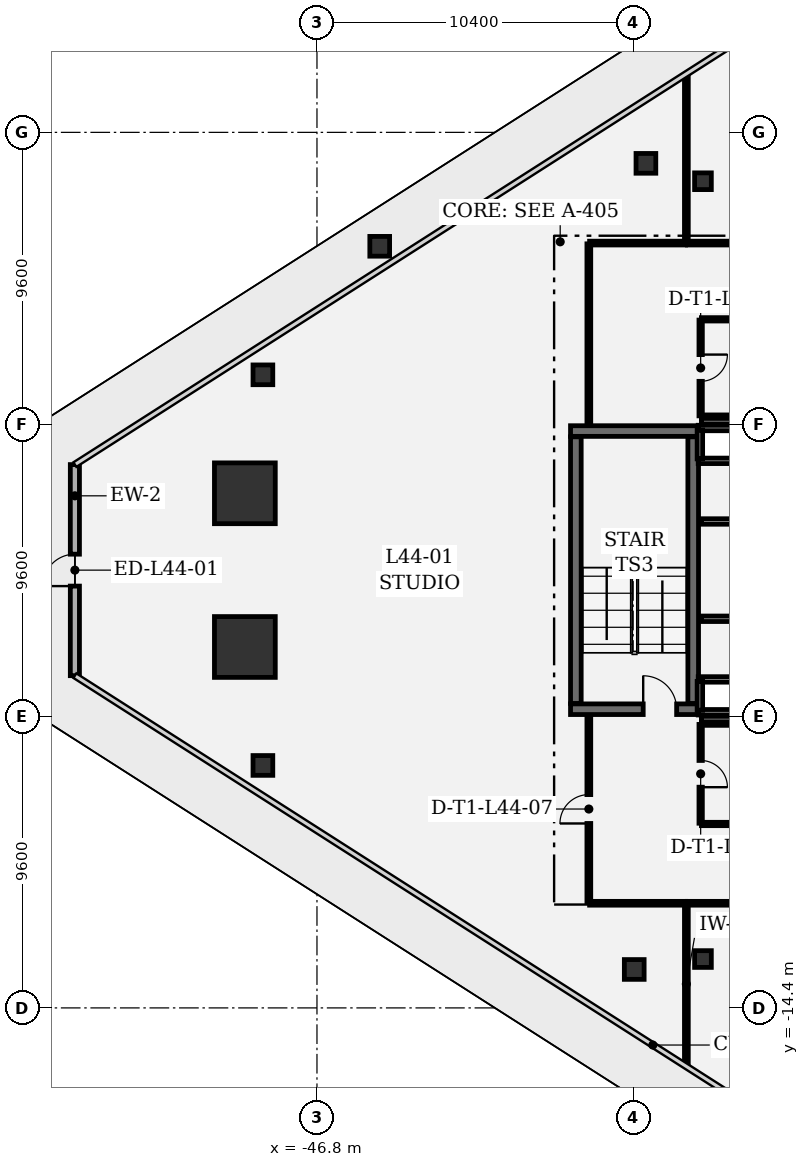
"""IFC4 building model, lengths in metres.
Left out: names, types, materials, properties, quantities, classifications, styles, units other than length and angle.
Written with IfcOpenShell. Run it as: python <this file> out.ifc"""

import sys

from ifc_helpers import new_model, si_unit, direction, frame, frame_2d, origin, origin_2d, place, context, subcontext, project, spatial, rectangle, extrude, element, fill, save


model = new_model("IFC4")
c1 = context("Model", 3, precision=1e-05, world=origin(), true_north=direction((0.0, 1.0)))
c2 = subcontext(c1, "Body", "Model", "MODEL_VIEW")
j1 = project(units=[si_unit("LENGTHUNIT", "METRE"), si_unit("PLANEANGLEUNIT", "RADIAN")], contexts=[c1])
p1 = place(None, origin())
s1 = spatial("IfcSite", under=j1, at=p1, CompositionType="ELEMENT")
p2 = place(p1, origin())
s2 = spatial("IfcBuilding", under=s1, at=p2, CompositionType="ELEMENT")
p3 = place(p2, frame((0.0, 0.0, 192.9)))
s3 = spatial("IfcBuildingStorey", under=s2, at=p3, CompositionType="ELEMENT", Elevation=192.9)
for number, where, z_axis, x_axis in (
    (1, (-49.172, 2.528, 0.0), (0.0, 0.0, 1.0), (1.0, 0.0, 0.0)),
    (2, (-49.172, -2.528, 0.0), (0.0, 0.0, 1.0), (1.0, 0.0, 0.0)),
):
    element("IfcColumn", number, at=place(p3, frame(where, z_axis=z_axis, x_axis=x_axis)), inside=s3, PredefinedType="COLUMN", context=c2, shape_type="SweptSolid", body=[
        extrude(rectangle(XDim=2.0, YDim=2.0, at=origin_2d()), origin(), (0.0, 0.0, 1.0), 4.05),
    ])
for number, where, z_axis, x_axis in (
    (3, (-44.736, 10.652, 0.0), (0.0, 0.0, 1.0), (1.0, 0.0, 0.0)),
    (4, (-48.578, 6.425, 0.0), (0.0, 0.0, 1.0), (1.0, 0.0, 0.0)),
    (5, (-48.578, -6.425, 0.0), (0.0, 0.0, 1.0), (1.0, 0.0, 0.0)),
    (6, (-35.981, 13.381, 0.0), (0.0, 0.0, 1.0), (1.0, 0.0, 0.0)),
    (7, (-36.365, -13.135, 0.0), (0.0, 0.0, 1.0), (1.0, 0.0, 0.0)),
):
    element("IfcColumn", number, at=place(p3, frame(where, z_axis=z_axis, x_axis=x_axis)), inside=s3, PredefinedType="COLUMN", context=c2, shape_type="SweptSolid", body=[
        extrude(rectangle(XDim=0.65, YDim=0.65, at=origin_2d()), origin(), (0.0, 0.0, 1.0), 4.05),
    ])
for number, where, z_axis, x_axis in (
    (8, (-34.104, 12.792, 0.0), (0.0, 0.0, 1.0), (1.0, 0.0, 0.0)),
    (9, (-34.104, -12.792, 0.0), (0.0, 0.0, 1.0), (1.0, 0.0, 0.0)),
):
    element("IfcColumn", number, at=place(p3, frame(where, z_axis=z_axis, x_axis=x_axis)), inside=s3, PredefinedType="COLUMN", context=c2, shape_type="SweptSolid", body=[
        extrude(rectangle(XDim=0.55, YDim=0.55, at=origin_2d()), origin(), (0.0, 0.0, 1.0), 4.05),
    ])
p4 = place(p3, frame((-54.763, -3.471, 0.0), z_axis=(0.0, 0.0, 1.0), x_axis=(0.0, 1.0, 0.0)))
e10 = element("IfcWall", 10, at=p4, inside=s3, PredefinedType="SOLIDWALL", context=c2, shape_type="SweptSolid", body=[
    extrude(rectangle(XDim=6.943, YDim=0.3, at=frame_2d((3.471, 0.0))), origin(), (0.0, 0.0, 1.0), 3.78),
])
p5 = place(p4, frame((2.946, 0.0, 0.0)))
e11 = element("IfcOpeningElement", 11, at=p5, cuts=e10, PredefinedType="OPENING", context=c2, shape_type="SweptSolid", body=[
    extrude(rectangle(XDim=1.05, YDim=2.2, at=frame_2d((0.525, 1.1))), frame((0.0, 0.16, 0.0), z_axis=(0.0, -1.0, 0.0), x_axis=(1.0, 0.0, 0.0)), (0.0, 0.0, 1.0), 0.32),
])
p6 = place(p3, frame((-38.46, -4.575, 0.0), z_axis=(0.0, 0.0, 1.0), x_axis=(1.0, 0.0, 0.0)))
e12 = element("IfcWall", 12, at=p6, inside=s3, PredefinedType="SHEAR", context=c2, shape_type="SweptSolid", body=[
    extrude(rectangle(XDim=4.21, YDim=0.35, at=frame_2d((2.105, 0.0))), origin(), (0.0, 0.0, 1.0), 3.78),
])
p7 = place(p6, frame((2.39, 0.0, 0.0)))
e13 = element("IfcOpeningElement", 13, at=p7, cuts=e12, PredefinedType="OPENING", context=c2, shape_type="SweptSolid", body=[
    extrude(rectangle(XDim=1.1, YDim=2.2, at=frame_2d((0.55, 1.1))), frame((0.0, 0.185, 0.0), z_axis=(0.0, -1.0, 0.0), x_axis=(1.0, 0.0, 0.0)), (0.0, 0.0, 1.0), 0.37),
])
p8 = place(p3, frame((-34.25, 4.575, 0.0), z_axis=(0.0, 0.0, 1.0), x_axis=(-1.0, 0.0, 0.0)))
e14 = element("IfcWall", 14, at=p8, inside=s3, PredefinedType="SHEAR", context=c2, shape_type="SweptSolid", body=[
    extrude(rectangle(XDim=4.21, YDim=0.35, at=frame_2d((2.105, 0.0))), origin(), (0.0, 0.0, 1.0), 3.78),
])
for number, where, z_axis, x_axis in (
    (15, (-34.425, -4.385, 0.0), (0.0, 0.0, 1.0), (0.0, 1.0, 0.0)),
    (16, (-38.285, 4.385, 0.0), (0.0, 0.0, 1.0), (0.0, -1.0, 0.0)),
):
    element("IfcWall", number, at=place(p3, frame(where, z_axis=z_axis, x_axis=x_axis)), inside=s3, PredefinedType="SHEAR", context=c2, shape_type="SweptSolid", body=[
        extrude(rectangle(XDim=8.77, YDim=0.35, at=frame_2d((4.385, 0.0))), origin(), (0.0, 0.0, 1.0), 3.78),
    ])
for number, where, z_axis, x_axis in (
    (17, (-32.99, 3.595, 0.0), (0.0, 0.0, 1.0), (-1.0, 0.0, 0.0)),
    (18, (-34.26, 4.675, 0.0), (0.0, 0.0, 1.0), (1.0, 0.0, 0.0)),
):
    element("IfcWall", number, at=place(p3, frame(where, z_axis=z_axis, x_axis=x_axis)), inside=s3, PredefinedType="PARTITIONING", context=c2, shape_type="SweptSolid", body=[
        extrude(rectangle(XDim=1.27, YDim=0.18, at=frame_2d((0.635, 0.0))), origin(), (0.0, 0.0, 1.0), 3.78),
    ])
p9 = place(p3, frame((-34.205, 3.66, 0.0), z_axis=(0.0, 0.0, 1.0), x_axis=(0.0, 1.0, 0.0)))
e19 = element("IfcWall", 19, at=p9, inside=s3, PredefinedType="PARTITIONING", context=c2, shape_type="SweptSolid", body=[
    extrude(rectangle(XDim=0.95, YDim=0.18, at=frame_2d((0.475, 0.0))), origin(), (0.0, 0.0, 1.0), 3.78),
])
for number, where, z_axis, x_axis in (
    (20, (-32.99, -4.675, 0.0), (0.0, 0.0, 1.0), (-1.0, 0.0, 0.0)),
    (21, (-34.26, -3.595, 0.0), (0.0, 0.0, 1.0), (1.0, 0.0, 0.0)),
):
    element("IfcWall", number, at=place(p3, frame(where, z_axis=z_axis, x_axis=x_axis)), inside=s3, PredefinedType="PARTITIONING", context=c2, shape_type="SweptSolid", body=[
        extrude(rectangle(XDim=1.27, YDim=0.18, at=frame_2d((0.635, 0.0))), origin(), (0.0, 0.0, 1.0), 3.78),
    ])
p10 = place(p3, frame((-34.205, -4.61, 0.0), z_axis=(0.0, 0.0, 1.0), x_axis=(0.0, 1.0, 0.0)))
e22 = element("IfcWall", 22, at=p10, inside=s3, PredefinedType="PARTITIONING", context=c2, shape_type="SweptSolid", body=[
    extrude(rectangle(XDim=0.95, YDim=0.18, at=frame_2d((0.475, 0.0))), origin(), (0.0, 0.0, 1.0), 3.78),
])
p11 = place(p3, frame((-34.18, 8.225, 0.0), z_axis=(0.0, 0.0, 1.0), x_axis=(0.0, -1.0, 0.0)))
e23 = element("IfcWall", 23, at=p11, inside=s3, PredefinedType="PARTITIONING", context=c2, shape_type="SweptSolid", body=[
    extrude(rectangle(XDim=3.15, YDim=0.11, at=frame_2d((1.575, 0.0))), origin(), (0.0, 0.0, 1.0), 3.78),
])
p12 = place(p11, frame((1.135, 0.0, 0.0)))
e24 = element("IfcOpeningElement", 24, at=p12, cuts=e23, PredefinedType="OPENING", context=c2, shape_type="SweptSolid", body=[
    extrude(rectangle(XDim=0.88, YDim=2.1, at=frame_2d((0.44, 1.05))), frame((0.0, 0.065, 0.0), z_axis=(0.0, -1.0, 0.0), x_axis=(1.0, 0.0, 0.0)), (0.0, 0.0, 1.0), 0.13),
])
p13 = place(p3, frame((-34.155, 5.05, 0.0), z_axis=(0.0, 0.0, 1.0), x_axis=(1.0, 0.0, 0.0)))
e25 = element("IfcWall", 25, at=p13, inside=s3, PredefinedType="PARTITIONING", context=c2, shape_type="SweptSolid", body=[
    extrude(rectangle(XDim=3.14, YDim=0.11, at=frame_2d((1.57, 0.0))), origin(), (0.0, 0.0, 1.0), 3.78),
])
p14 = place(p3, frame((-30.905, 8.25, 0.0), z_axis=(0.0, 0.0, 1.0), x_axis=(-1.0, 0.0, 0.0)))
e26 = element("IfcWall", 26, at=p14, inside=s3, PredefinedType="PARTITIONING", context=c2, shape_type="SweptSolid", body=[
    extrude(rectangle(XDim=3.25, YDim=0.11, at=frame_2d((1.625, 0.0))), origin(), (0.0, 0.0, 1.0), 3.78),
])
p15 = place(p3, frame((-34.155, -8.35, 0.0), z_axis=(0.0, 0.0, 1.0), x_axis=(1.0, 0.0, 0.0)))
e27 = element("IfcWall", 27, at=p15, inside=s3, PredefinedType="PARTITIONING", context=c2, shape_type="SweptSolid", body=[
    extrude(rectangle(XDim=3.25, YDim=0.11, at=frame_2d((1.625, 0.0))), origin(), (0.0, 0.0, 1.0), 3.344),
])
p16 = place(p3, frame((-31.015, -5.05, 0.0), z_axis=(0.0, 0.0, 1.0), x_axis=(-1.0, 0.0, 0.0)))
e28 = element("IfcWall", 28, at=p16, inside=s3, PredefinedType="PARTITIONING", context=c2, shape_type="SweptSolid", body=[
    extrude(rectangle(XDim=3.14, YDim=0.11, at=frame_2d((1.57, 0.0))), origin(), (0.0, 0.0, 1.0), 3.78),
])
p17 = place(p3, frame((-34.18, -5.075, 0.0), z_axis=(0.0, 0.0, 1.0), x_axis=(0.0, -1.0, 0.0)))
e29 = element("IfcWall", 29, at=p17, inside=s3, PredefinedType="PARTITIONING", context=c2, shape_type="SweptSolid", body=[
    extrude(rectangle(XDim=3.25, YDim=0.11, at=frame_2d((1.625, 0.0))), origin(), (0.0, 0.0, 1.0), 3.78),
])
p18 = place(p17, frame((1.185, 0.0, 0.0)))
e30 = element("IfcOpeningElement", 30, at=p18, cuts=e29, PredefinedType="OPENING", context=c2, shape_type="SweptSolid", body=[
    extrude(rectangle(XDim=0.88, YDim=2.1, at=frame_2d((0.44, 1.05))), frame((0.0, 0.065, 0.0), z_axis=(0.0, -1.0, 0.0), x_axis=(1.0, 0.0, 0.0)), (0.0, 0.0, 1.0), 0.13),
])
p19 = place(p3, frame((-34.155, 1.6, 0.0), z_axis=(0.0, 0.0, 1.0), x_axis=(1.0, 0.0, 0.0)))
e31 = element("IfcWall", 31, at=p19, inside=s3, PredefinedType="PARTITIONING", context=c2, shape_type="SweptSolid", body=[
    extrude(rectangle(XDim=3.25, YDim=0.18, at=frame_2d((1.625, 0.0))), origin(), (0.0, 0.0, 1.0), 3.78),
])
p20 = place(p19, frame((1.185, 0.0, 0.0)))
e32 = element("IfcOpeningElement", 32, at=p20, cuts=e31, PredefinedType="OPENING", context=c2, shape_type="SweptSolid", body=[
    extrude(rectangle(XDim=0.88, YDim=2.1, at=frame_2d((0.44, 1.05))), frame((0.0, 0.1, 0.0), z_axis=(0.0, -1.0, 0.0), x_axis=(1.0, 0.0, 0.0)), (0.0, 0.0, 1.0), 0.2),
])
for number, where, z_axis, x_axis in (
    (33, (-31.015, 4.9, 0.0), (0.0, 0.0, 1.0), (-1.0, 0.0, 0.0)),
    (34, (-34.155, -4.9, 0.0), (0.0, 0.0, 1.0), (1.0, 0.0, 0.0)),
):
    element("IfcWall", number, at=place(p3, frame(where, z_axis=z_axis, x_axis=x_axis)), inside=s3, PredefinedType="PARTITIONING", context=c2, shape_type="SweptSolid", body=[
        extrude(rectangle(XDim=3.14, YDim=0.18, at=frame_2d((1.57, 0.0))), origin(), (0.0, 0.0, 1.0), 3.78),
    ])
p21 = place(p3, frame((-30.905, -1.6, 0.0), z_axis=(0.0, 0.0, 1.0), x_axis=(-1.0, 0.0, 0.0)))
e35 = element("IfcWall", 35, at=p21, inside=s3, PredefinedType="PARTITIONING", context=c2, shape_type="SweptSolid", body=[
    extrude(rectangle(XDim=3.25, YDim=0.18, at=frame_2d((1.625, 0.0))), origin(), (0.0, 0.0, 1.0), 3.78),
])
p22 = place(p21, frame((1.185, 0.0, 0.0)))
e36 = element("IfcOpeningElement", 36, at=p22, cuts=e35, PredefinedType="OPENING", context=c2, shape_type="SweptSolid", body=[
    extrude(rectangle(XDim=0.88, YDim=2.1, at=frame_2d((0.44, 1.05))), frame((0.0, 0.1, 0.0), z_axis=(0.0, -1.0, 0.0), x_axis=(1.0, 0.0, 0.0)), (0.0, 0.0, 1.0), 0.2),
])
p23 = place(p3, frame((-34.65, -16.246, 0.0), z_axis=(0.0, 0.0, 1.0), x_axis=(0.0, 1.0, 0.0)))
e37 = element("IfcWall", 37, at=p23, inside=s3, PredefinedType="PARTITIONING", context=c2, shape_type="SweptSolid", body=[
    extrude(rectangle(XDim=5.263, YDim=0.125, at=frame_2d((2.632, 0.0))), origin(), (0.0, 0.0, 1.0), 3.78),
])
p24 = place(p3, frame((-37.833, -10.958, 0.0), z_axis=(0.0, 0.0, 1.0), x_axis=(1.0, 0.0, 0.0)))
e38 = element("IfcWall", 38, at=p24, inside=s3, PredefinedType="PARTITIONING", context=c2, shape_type="SweptSolid", body=[
    extrude(rectangle(XDim=3.158, YDim=0.125, at=frame_2d((1.579, 0.0))), origin(), (0.0, 0.0, 1.0), 2.9),
])
p25 = place(p3, frame((-37.858, -10.933, 0.0), z_axis=(0.0, 0.0, 1.0), x_axis=(0.0, 1.0, 0.0)))
e39 = element("IfcWall", 39, at=p25, inside=s3, PredefinedType="PARTITIONING", context=c2, shape_type="SweptSolid", body=[
    extrude(rectangle(XDim=6.15, YDim=0.125, at=frame_2d((3.075, 0.0))), origin(), (0.0, 0.0, 1.0), 3.78),
])
p26 = place(p25, frame((2.6, 0.0, 0.0)))
e40 = element("IfcOpeningElement", 40, at=p26, cuts=e39, PredefinedType="OPENING", context=c2, shape_type="SweptSolid", body=[
    extrude(rectangle(XDim=0.95, YDim=2.15, at=frame_2d((0.475, 1.075))), frame((0.0, 0.073, 0.0), z_axis=(0.0, -1.0, 0.0), x_axis=(1.0, 0.0, 0.0)), (0.0, 0.0, 1.0), 0.145),
])
p27 = place(p3, frame((-37.858, 4.783, 0.0), z_axis=(0.0, 0.0, 1.0), x_axis=(0.0, 1.0, 0.0)))
e41 = element("IfcWall", 41, at=p27, inside=s3, PredefinedType="PARTITIONING", context=c2, shape_type="SweptSolid", body=[
    extrude(rectangle(XDim=5.95, YDim=0.125, at=frame_2d((2.975, 0.0))), origin(), (0.0, 0.0, 1.0), 3.78),
])
p28 = place(p3, frame((-34.675, 10.758, 0.0), z_axis=(0.0, 0.0, 1.0), x_axis=(-1.0, 0.0, 0.0)))
e42 = element("IfcWall", 42, at=p28, inside=s3, PredefinedType="PARTITIONING", context=c2, shape_type="SweptSolid", body=[
    extrude(rectangle(XDim=3.158, YDim=0.125, at=frame_2d((1.579, 0.0))), origin(), (0.0, 0.0, 1.0), 2.9),
])
p29 = place(p3, frame((-34.65, 10.783, 0.0), z_axis=(0.0, 0.0, 1.0), x_axis=(0.0, 1.0, 0.0)))
e43 = element("IfcWall", 43, at=p29, inside=s3, PredefinedType="PARTITIONING", context=c2, shape_type="SweptSolid", body=[
    extrude(rectangle(XDim=5.463, YDim=0.125, at=frame_2d((2.731, 0.0))), origin(), (0.0, 0.0, 1.0), 3.78),
])
p30 = place(p3, frame((-34.617, 10.758, 0.0), z_axis=(0.0, 0.0, 1.0), x_axis=(1.0, 0.0, 0.0)))
e44 = element("IfcWall", 44, at=p30, inside=s3, PredefinedType="PARTITIONING", context=c2, shape_type="SweptSolid", body=[
    extrude(rectangle(XDim=21.442, YDim=0.125, at=frame_2d((10.721, 0.0))), origin(), (0.0, 0.0, 1.0), 2.9),
])
p31 = place(p30, frame((8.782, 0.0, 0.0)))
e45 = element("IfcOpeningElement", 45, at=p31, cuts=e44, PredefinedType="OPENING", context=c2, shape_type="SweptSolid", body=[
    extrude(rectangle(XDim=0.95, YDim=2.15, at=frame_2d((0.475, 1.075))), frame((0.0, 0.073, 0.0), z_axis=(0.0, -1.0, 0.0), x_axis=(1.0, 0.0, 0.0)), (0.0, 0.0, 1.0), 0.145),
])
p32 = place(p3, frame((-13.175, -10.958, 0.0), z_axis=(0.0, 0.0, 1.0), x_axis=(-1.0, 0.0, 0.0)))
e46 = element("IfcWall", 46, at=p32, inside=s3, PredefinedType="PARTITIONING", context=c2, shape_type="SweptSolid", body=[
    extrude(rectangle(XDim=21.442, YDim=0.125, at=frame_2d((10.721, 0.0))), origin(), (0.0, 0.0, 1.0), 2.9),
])
p33 = place(p32, frame((8.782, 0.0, 0.0)))
e47 = element("IfcOpeningElement", 47, at=p33, cuts=e46, PredefinedType="OPENING", context=c2, shape_type="SweptSolid", body=[
    extrude(rectangle(XDim=0.95, YDim=2.15, at=frame_2d((0.475, 1.075))), frame((0.0, 0.073, 0.0), z_axis=(0.0, -1.0, 0.0), x_axis=(1.0, 0.0, 0.0)), (0.0, 0.0, 1.0), 0.145),
])
p34 = place(p5, origin())
e48 = element("IfcDoor", 48, at=p34, inside=s3, OperationType="SINGLE_SWING_LEFT", PredefinedType="DOOR", context=c2, shape_type="SweptSolid", body=[
    extrude(rectangle(XDim=1.05, YDim=2.2, at=frame_2d((0.525, 1.1))), frame((0.0, 0.025, 0.0), z_axis=(0.0, -1.0, 0.0), x_axis=(1.0, 0.0, 0.0)), (0.0, 0.0, 1.0), 0.05),
])
fill(e11, e48)
p35 = place(p7, origin())
e49 = element("IfcDoor", 49, at=p35, inside=s3, OperationType="SINGLE_SWING_LEFT", PredefinedType="DOOR", context=c2, shape_type="SweptSolid", body=[
    extrude(rectangle(XDim=1.1, YDim=2.2, at=frame_2d((0.55, 1.1))), frame((0.0, 0.025, 0.0), z_axis=(0.0, -1.0, 0.0), x_axis=(1.0, 0.0, 0.0)), (0.0, 0.0, 1.0), 0.05),
])
fill(e13, e49)
p36 = place(p12, origin())
e50 = element("IfcDoor", 50, at=p36, inside=s3, OperationType="SINGLE_SWING_LEFT", PredefinedType="DOOR", context=c2, shape_type="SweptSolid", body=[
    extrude(rectangle(XDim=0.88, YDim=2.1, at=frame_2d((0.44, 1.05))), frame((0.0, 0.025, 0.0), z_axis=(0.0, -1.0, 0.0), x_axis=(1.0, 0.0, 0.0)), (0.0, 0.0, 1.0), 0.05),
])
fill(e24, e50)
p37 = place(p18, origin())
e51 = element("IfcDoor", 51, at=p37, inside=s3, OperationType="SINGLE_SWING_RIGHT", PredefinedType="DOOR", context=c2, shape_type="SweptSolid", body=[
    extrude(rectangle(XDim=0.88, YDim=2.1, at=frame_2d((0.44, 1.05))), frame((0.0, 0.025, 0.0), z_axis=(0.0, -1.0, 0.0), x_axis=(1.0, 0.0, 0.0)), (0.0, 0.0, 1.0), 0.05),
])
fill(e30, e51)
p38 = place(p26, origin())
e52 = element("IfcDoor", 52, at=p38, inside=s3, OperationType="SINGLE_SWING_LEFT", PredefinedType="DOOR", context=c2, shape_type="SweptSolid", body=[
    extrude(rectangle(XDim=0.95, YDim=2.15, at=frame_2d((0.475, 1.075))), frame((0.0, 0.025, 0.0), z_axis=(0.0, -1.0, 0.0), x_axis=(1.0, 0.0, 0.0)), (0.0, 0.0, 1.0), 0.05),
])
fill(e40, e52)
save(model, sys.argv[1])
